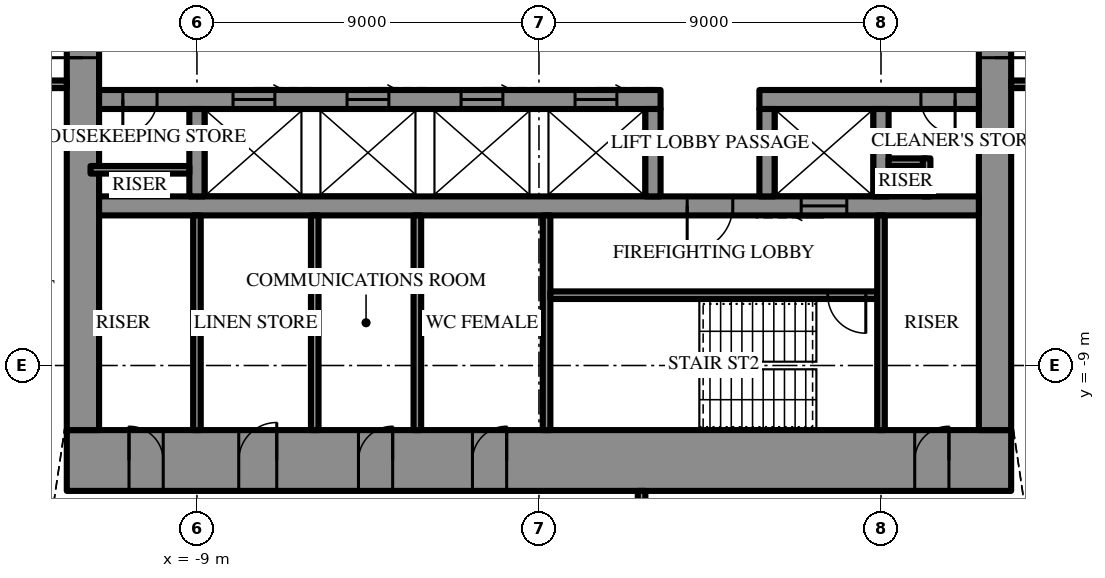
"""IFC4 building model, lengths in metres.
Left out: names, types, materials, properties, quantities, classifications, styles, units other than length and angle.
Written with IfcOpenShell. Run it as: python <this file> out.ifc"""

import sys

from ifc_helpers import new_model, si_unit, direction, frame, frame_2d, origin, place, context, subcontext, project, spatial, rectangle, extrude, element, fill, save


model = new_model("IFC4")
c1 = context("Model", 3, precision=1e-05, world=origin(), true_north=direction((0.0, 1.0)))
c2 = subcontext(c1, "Body", "Model", "MODEL_VIEW")
j1 = project(units=[si_unit("LENGTHUNIT", "METRE"), si_unit("PLANEANGLEUNIT", "RADIAN")], contexts=[c1])
p1 = place(None, origin())
s1 = spatial("IfcSite", under=j1, at=p1, CompositionType="ELEMENT")
p2 = place(p1, origin())
s2 = spatial("IfcBuilding", under=s1, at=p2, CompositionType="ELEMENT")
p3 = place(p2, frame((0.0, 0.0, 332.5)))
s3 = spatial("IfcBuildingStorey", under=s2, at=p3, CompositionType="ELEMENT", Elevation=332.5)
p4 = place(p3, frame((12.425, -11.5, 0.0), z_axis=(0.0, 0.0, 1.0), x_axis=(-1.0, 0.0, 0.0)))
e1 = element("IfcWall", 1, at=p4, inside=s3, PredefinedType="SHEAR", context=c2, shape_type="SweptSolid", body=[
    extrude(rectangle(XDim=24.85, YDim=1.6, at=frame_2d((12.425, 0.0))), origin(), (0.0, 0.0, 1.0), 4.2),
])
p5 = place(p4, frame((13.275, 0.0, 0.0)))
e2 = element("IfcOpeningElement", 2, at=p5, cuts=e1, PredefinedType="OPENING", context=c2, shape_type="SweptSolid", body=[
    extrude(rectangle(XDim=0.9, YDim=2.2, at=frame_2d((0.45, 1.1))), frame((0.0, 0.81, 0.0), z_axis=(0.0, -1.0, 0.0), x_axis=(1.0, 0.0, 0.0)), (0.0, 0.0, 1.0), 1.62),
])
p6 = place(p4, frame((16.275, 0.0, 0.0)))
e3 = element("IfcOpeningElement", 3, at=p6, cuts=e1, PredefinedType="OPENING", context=c2, shape_type="SweptSolid", body=[
    extrude(rectangle(XDim=0.9, YDim=2.2, at=frame_2d((0.45, 1.1))), frame((0.0, 0.81, 0.0), z_axis=(0.0, -1.0, 0.0), x_axis=(1.0, 0.0, 0.0)), (0.0, 0.0, 1.0), 1.62),
])
p7 = place(p4, frame((19.325, 0.0, 0.0)))
e4 = element("IfcOpeningElement", 4, at=p7, cuts=e1, PredefinedType="OPENING", context=c2, shape_type="SweptSolid", body=[
    extrude(rectangle(XDim=1.0, YDim=2.2, at=frame_2d((0.5, 1.1))), frame((0.0, 0.81, 0.0), z_axis=(0.0, -1.0, 0.0), x_axis=(1.0, 0.0, 0.0)), (0.0, 0.0, 1.0), 1.62),
])
p8 = place(p4, frame((1.637, 0.0, 0.0)))
e5 = element("IfcOpeningElement", 5, at=p8, cuts=e1, PredefinedType="OPENING", context=c2, shape_type="SweptSolid", body=[
    extrude(rectangle(XDim=0.9, YDim=2.2, at=frame_2d((0.45, 1.1))), frame((0.0, 0.81, 0.0), z_axis=(0.0, -1.0, 0.0), x_axis=(1.0, 0.0, 0.0)), (0.0, 0.0, 1.0), 1.62),
])
p9 = place(p4, frame((22.312, 0.0, 0.0)))
e6 = element("IfcOpeningElement", 6, at=p9, cuts=e1, PredefinedType="OPENING", context=c2, shape_type="SweptSolid", body=[
    extrude(rectangle(XDim=0.9, YDim=2.2, at=frame_2d((0.45, 1.1))), frame((0.0, 0.81, 0.0), z_axis=(0.0, -1.0, 0.0), x_axis=(1.0, 0.0, 0.0)), (0.0, 0.0, 1.0), 1.62),
])
p10 = place(p3, frame((12.0, -10.7, 0.0), z_axis=(0.0, 0.0, 1.0), x_axis=(0.0, 1.0, 0.0)))
e7 = element("IfcWall", 7, at=p10, inside=s3, PredefinedType="SHEAR", context=c2, shape_type="SweptSolid", body=[
    extrude(rectangle(XDim=21.4, YDim=0.85, at=frame_2d((10.7, 0.0))), origin(), (0.0, 0.0, 1.0), 4.2),
])
p11 = place(p10, frame((9.8, 0.0, 0.0)))
e8 = element("IfcOpeningElement", 8, at=p11, cuts=e7, PredefinedType="OPENING", context=c2, shape_type="SweptSolid", body=[
    extrude(rectangle(XDim=1.8, YDim=2.4, at=frame_2d((0.9, 1.2))), frame((0.0, 0.435, 0.0), z_axis=(0.0, -1.0, 0.0), x_axis=(1.0, 0.0, 0.0)), (0.0, 0.0, 1.0), 0.87),
])
p12 = place(p3, frame((-12.0, 10.7, 0.0), z_axis=(0.0, 0.0, 1.0), x_axis=(0.0, -1.0, 0.0)))
e9 = element("IfcWall", 9, at=p12, inside=s3, PredefinedType="SHEAR", context=c2, shape_type="SweptSolid", body=[
    extrude(rectangle(XDim=21.4, YDim=0.85, at=frame_2d((10.7, 0.0))), origin(), (0.0, 0.0, 1.0), 4.2),
])
p13 = place(p12, frame((9.8, 0.0, 0.0)))
e10 = element("IfcOpeningElement", 10, at=p13, cuts=e9, PredefinedType="OPENING", context=c2, shape_type="SweptSolid", body=[
    extrude(rectangle(XDim=1.8, YDim=2.4, at=frame_2d((0.9, 1.2))), frame((0.0, 0.435, 0.0), z_axis=(0.0, -1.0, 0.0), x_axis=(1.0, 0.0, 0.0)), (0.0, 0.0, 1.0), 0.87),
])
p14 = place(p3, frame((11.575, -2.0, 0.0), z_axis=(0.0, 0.0, 1.0), x_axis=(-1.0, 0.0, 0.0)))
e11 = element("IfcWall", 11, at=p14, inside=s3, PredefinedType="SHEAR", context=c2, shape_type="SweptSolid", body=[
    extrude(rectangle(XDim=5.775, YDim=0.5, at=frame_2d((2.887, 0.0))), origin(), (0.0, 0.0, 1.0), 4.2),
])
p15 = place(p14, frame((0.625, 0.0, 0.0)))
e12 = element("IfcOpeningElement", 12, at=p15, cuts=e11, PredefinedType="OPENING", context=c2, shape_type="SweptSolid", body=[
    extrude(rectangle(XDim=0.9, YDim=2.2, at=frame_2d((0.45, 1.1))), frame((0.0, 0.26, 0.0), z_axis=(0.0, -1.0, 0.0), x_axis=(1.0, 0.0, 0.0)), (0.0, 0.0, 1.0), 0.52),
])
p16 = place(p3, frame((3.2, -2.0, 0.0), z_axis=(0.0, 0.0, 1.0), x_axis=(-1.0, 0.0, 0.0)))
e13 = element("IfcWall", 13, at=p16, inside=s3, PredefinedType="SHEAR", context=c2, shape_type="SweptSolid", body=[
    extrude(rectangle(XDim=14.775, YDim=0.5, at=frame_2d((7.387, 0.0))), origin(), (0.0, 0.0, 1.0), 4.2),
])
p17 = place(p16, frame((13.25, 0.0, 0.0)))
e14 = element("IfcOpeningElement", 14, at=p17, cuts=e13, PredefinedType="OPENING", context=c2, shape_type="SweptSolid", body=[
    extrude(rectangle(XDim=0.9, YDim=2.2, at=frame_2d((0.45, 1.1))), frame((0.0, 0.26, 0.0), z_axis=(0.0, -1.0, 0.0), x_axis=(1.0, 0.0, 0.0)), (0.0, 0.0, 1.0), 0.52),
])
p18 = place(p16, frame((1.15, 0.0, 0.0)))
e15 = element("IfcOpeningElement", 15, at=p18, cuts=e13, PredefinedType="OPENING", context=c2, shape_type="SweptSolid", body=[
    extrude(rectangle(XDim=1.1, YDim=2.2, at=frame_2d((0.55, 1.1))), frame((0.0, 0.26, 0.0), z_axis=(0.0, -1.0, 0.0), x_axis=(1.0, 0.0, 0.0)), (0.0, 0.0, 1.0), 0.52),
])
p19 = place(p16, frame((4.15, 0.0, 0.0)))
e16 = element("IfcOpeningElement", 16, at=p19, cuts=e13, PredefinedType="OPENING", context=c2, shape_type="SweptSolid", body=[
    extrude(rectangle(XDim=1.1, YDim=2.2, at=frame_2d((0.55, 1.1))), frame((0.0, 0.26, 0.0), z_axis=(0.0, -1.0, 0.0), x_axis=(1.0, 0.0, 0.0)), (0.0, 0.0, 1.0), 0.52),
])
p20 = place(p16, frame((7.15, 0.0, 0.0)))
e17 = element("IfcOpeningElement", 17, at=p20, cuts=e13, PredefinedType="OPENING", context=c2, shape_type="SweptSolid", body=[
    extrude(rectangle(XDim=1.1, YDim=2.2, at=frame_2d((0.55, 1.1))), frame((0.0, 0.26, 0.0), z_axis=(0.0, -1.0, 0.0), x_axis=(1.0, 0.0, 0.0)), (0.0, 0.0, 1.0), 0.52),
])
p21 = place(p16, frame((10.15, 0.0, 0.0)))
e18 = element("IfcOpeningElement", 18, at=p21, cuts=e13, PredefinedType="OPENING", context=c2, shape_type="SweptSolid", body=[
    extrude(rectangle(XDim=1.1, YDim=2.2, at=frame_2d((0.55, 1.1))), frame((0.0, 0.26, 0.0), z_axis=(0.0, -1.0, 0.0), x_axis=(1.0, 0.0, 0.0)), (0.0, 0.0, 1.0), 0.52),
])
p22 = place(p3, frame((11.575, -4.8, 0.0), z_axis=(0.0, 0.0, 1.0), x_axis=(-1.0, 0.0, 0.0)))
e19 = element("IfcWall", 19, at=p22, inside=s3, PredefinedType="SHEAR", context=c2, shape_type="SweptSolid", body=[
    extrude(rectangle(XDim=23.15, YDim=0.5, at=frame_2d((11.575, 0.0))), origin(), (0.0, 0.0, 1.0), 4.2),
])
p23 = place(p22, frame((6.475, 0.0, 0.0)))
e20 = element("IfcOpeningElement", 20, at=p23, cuts=e19, PredefinedType="OPENING", context=c2, shape_type="SweptSolid", body=[
    extrude(rectangle(XDim=1.2, YDim=2.2, at=frame_2d((0.6, 1.1))), frame((0.0, 0.26, 0.0), z_axis=(0.0, -1.0, 0.0), x_axis=(1.0, 0.0, 0.0)), (0.0, 0.0, 1.0), 0.52),
])
p24 = place(p22, frame((3.475, 0.0, 0.0)))
e21 = element("IfcOpeningElement", 21, at=p24, cuts=e19, PredefinedType="OPENING", context=c2, shape_type="SweptSolid", body=[
    extrude(rectangle(XDim=1.2, YDim=2.2, at=frame_2d((0.6, 1.1))), frame((0.0, 0.26, 0.0), z_axis=(0.0, -1.0, 0.0), x_axis=(1.0, 0.0, 0.0)), (0.0, 0.0, 1.0), 0.52),
])
for number, where, z_axis, x_axis in (
    (22, (9.0, -2.25, 0.0), (0.0, 0.0, 1.0), (0.0, -1.0, 0.0)),
    (23, (6.0, -2.25, 0.0), (0.0, 0.0, 1.0), (0.0, -1.0, 0.0)),
    (24, (3.0, -2.25, 0.0), (0.0, 0.0, 1.0), (0.0, -1.0, 0.0)),
    (25, (-9.0, -2.25, 0.0), (0.0, 0.0, 1.0), (0.0, -1.0, 0.0)),
):
    element("IfcWall", number, at=place(p3, frame(where, z_axis=z_axis, x_axis=x_axis)), inside=s3, PredefinedType="SHEAR", context=c2, shape_type="SweptSolid", body=[
        extrude(rectangle(XDim=2.3, YDim=0.4, at=frame_2d((1.15, 0.0))), origin(), (0.0, 0.0, 1.0), 4.2),
    ])
p25 = place(p3, frame((0.2, -5.05, 0.0), z_axis=(0.0, 0.0, 1.0), x_axis=(0.0, -1.0, 0.0)))
e26 = element("IfcWall", 26, at=p25, inside=s3, PredefinedType="SHEAR", context=c2, shape_type="SweptSolid", body=[
    extrude(rectangle(XDim=5.65, YDim=0.2, at=frame_2d((2.825, 0.0))), origin(), (0.0, 0.0, 1.0), 4.2),
])
p26 = place(p3, frame((8.9, -7.15, 0.0), z_axis=(0.0, 0.0, 1.0), x_axis=(-1.0, 0.0, 0.0)))
e27 = element("IfcWall", 27, at=p26, inside=s3, PredefinedType="SHEAR", context=c2, shape_type="SweptSolid", body=[
    extrude(rectangle(XDim=8.6, YDim=0.2, at=frame_2d((4.3, 0.0))), origin(), (0.0, 0.0, 1.0), 4.2),
])
p27 = place(p26, frame((0.3, 0.0, 0.0)))
e28 = element("IfcOpeningElement", 28, at=p27, cuts=e27, PredefinedType="OPENING", context=c2, shape_type="SweptSolid", body=[
    extrude(rectangle(XDim=1.0, YDim=2.2, at=frame_2d((0.5, 1.1))), frame((0.0, 0.11, 0.0), z_axis=(0.0, -1.0, 0.0), x_axis=(1.0, 0.0, 0.0)), (0.0, 0.0, 1.0), 0.22),
])
for number, where, z_axis, x_axis in (
    (29, (9.0, -5.05, 0.0), (0.0, 0.0, 1.0), (0.0, -1.0, 0.0)),
    (30, (-9.0, -5.05, 0.0), (0.0, 0.0, 1.0), (0.0, -1.0, 0.0)),
    (31, (-3.2, -5.05, 0.0), (0.0, 0.0, 1.0), (0.0, -1.0, 0.0)),
    (32, (-5.9, -5.05, 0.0), (0.0, 0.0, 1.0), (0.0, -1.0, 0.0)),
):
    element("IfcWall", number, at=place(p3, frame(where, z_axis=z_axis, x_axis=x_axis)), inside=s3, PredefinedType="PARTITIONING", context=c2, shape_type="SweptSolid", body=[
        extrude(rectangle(XDim=5.65, YDim=0.2, at=frame_2d((2.825, 0.0))), origin(), (0.0, 0.0, 1.0), 4.0),
    ])
for number, where, z_axis, x_axis in (
    (33, (10.2, -3.65, 0.0), (0.0, 0.0, 1.0), (-1.0, 0.0, 0.0)),
    (34, (10.2, -3.55, 0.0), (0.0, 0.0, 1.0), (0.0, -1.0, 0.0)),
):
    element("IfcWall", number, at=place(p3, frame(where, z_axis=z_axis, x_axis=x_axis)), inside=s3, PredefinedType="PARTITIONING", context=c2, shape_type="SweptSolid", body=[
        extrude(rectangle(XDim=1.0, YDim=0.2, at=frame_2d((0.5, 0.0))), origin(), (0.0, 0.0, 1.0), 4.0),
    ])
p28 = place(p3, frame((-9.2, -3.85, 0.0), z_axis=(0.0, 0.0, 1.0), x_axis=(-1.0, 0.0, 0.0)))
e35 = element("IfcWall", 35, at=p28, inside=s3, PredefinedType="PARTITIONING", context=c2, shape_type="SweptSolid", body=[
    extrude(rectangle(XDim=2.6, YDim=0.2, at=frame_2d((1.3, 0.0))), origin(), (0.0, 0.0, 1.0), 4.0),
])
p29 = place(p3, frame((2.7, -12.3, 0.0), z_axis=(0.0, 0.0, 1.0), x_axis=(0.0, -1.0, 0.0)))
e36 = element("IfcWall", 36, at=p29, inside=s3, PredefinedType="PARTITIONING", context=c2, shape_type="SweptSolid", body=[
    extrude(rectangle(XDim=1.7, YDim=0.2, at=frame_2d((0.85, 0.0))), origin(), (0.0, 0.0, 1.0), 4.0),
])
p30 = place(p29, frame((0.35, 0.0, 0.0)))
e37 = element("IfcOpeningElement", 37, at=p30, cuts=e36, PredefinedType="OPENING", context=c2, shape_type="SweptSolid", body=[
    extrude(rectangle(XDim=1.0, YDim=2.2, at=frame_2d((0.5, 1.1))), frame((0.0, 0.11, 0.0), z_axis=(0.0, -1.0, 0.0), x_axis=(1.0, 0.0, 0.0)), (0.0, 0.0, 1.0), 0.22),
])
p31 = place(p3, frame((12.425, -1.6, 0.0), z_axis=(0.0, 0.0, 1.0), x_axis=(1.0, 0.0, 0.0)))
e38 = element("IfcWall", 38, at=p31, inside=s3, PredefinedType="PARTITIONING", context=c2, shape_type="SweptSolid", body=[
    extrude(rectangle(XDim=16.5, YDim=0.2, at=frame_2d((8.25, 0.0))), origin(), (0.0, 0.0, 1.0), 4.0),
])
p32 = place(p31, frame((1.15, 0.0, 0.0)))
e39 = element("IfcOpeningElement", 39, at=p32, cuts=e38, PredefinedType="OPENING", context=c2, shape_type="SweptSolid", body=[
    extrude(rectangle(XDim=1.0, YDim=2.2, at=frame_2d((0.5, 1.1))), frame((0.0, 0.11, 0.0), z_axis=(0.0, -1.0, 0.0), x_axis=(1.0, 0.0, 0.0)), (0.0, 0.0, 1.0), 0.22),
])
p33 = place(p3, frame((-12.425, -1.6, 0.0), z_axis=(0.0, 0.0, 1.0), x_axis=(-1.0, 0.0, 0.0)))
e40 = element("IfcWall", 40, at=p33, inside=s3, PredefinedType="PARTITIONING", context=c2, shape_type="SweptSolid", body=[
    extrude(rectangle(XDim=16.5, YDim=0.2, at=frame_2d((8.25, 0.0))), origin(), (0.0, 0.0, 1.0), 4.0),
])
p34 = place(p33, frame((1.15, 0.0, 0.0)))
e41 = element("IfcOpeningElement", 41, at=p34, cuts=e40, PredefinedType="OPENING", context=c2, shape_type="SweptSolid", body=[
    extrude(rectangle(XDim=1.0, YDim=2.2, at=frame_2d((0.5, 1.1))), frame((0.0, 0.11, 0.0), z_axis=(0.0, -1.0, 0.0), x_axis=(1.0, 0.0, 0.0)), (0.0, 0.0, 1.0), 0.22),
])
p35 = place(p11, frame((1.8, 0.0, 0.0), z_axis=(0.0, 0.0, 1.0), x_axis=(-1.0, 0.0, 0.0)))
e42 = element("IfcDoor", 42, at=p35, inside=s3, OperationType="DOUBLE_DOOR_SINGLE_SWING", PredefinedType="DOOR", context=c2, shape_type="SweptSolid", body=[
    extrude(rectangle(XDim=1.8, YDim=2.4, at=frame_2d((0.9, 1.2))), frame((0.0, 0.025, 0.0), z_axis=(0.0, -1.0, 0.0), x_axis=(1.0, 0.0, 0.0)), (0.0, 0.0, 1.0), 0.05),
])
fill(e8, e42)
p36 = place(p13, frame((1.8, 0.0, 0.0), z_axis=(0.0, 0.0, 1.0), x_axis=(-1.0, 0.0, 0.0)))
e43 = element("IfcDoor", 43, at=p36, inside=s3, OperationType="DOUBLE_DOOR_SINGLE_SWING", PredefinedType="DOOR", context=c2, shape_type="SweptSolid", body=[
    extrude(rectangle(XDim=1.8, YDim=2.4, at=frame_2d((0.9, 1.2))), frame((0.0, 0.025, 0.0), z_axis=(0.0, -1.0, 0.0), x_axis=(1.0, 0.0, 0.0)), (0.0, 0.0, 1.0), 0.05),
])
fill(e10, e43)
p37 = place(p23, origin())
e44 = element("IfcDoor", 44, at=p37, inside=s3, OperationType="SINGLE_SWING_LEFT", PredefinedType="DOOR", context=c2, shape_type="SweptSolid", body=[
    extrude(rectangle(XDim=1.2, YDim=2.2, at=frame_2d((0.6, 1.1))), frame((0.0, 0.025, 0.0), z_axis=(0.0, -1.0, 0.0), x_axis=(1.0, 0.0, 0.0)), (0.0, 0.0, 1.0), 0.05),
])
fill(e20, e44)
p38 = place(p27, origin())
e45 = element("IfcDoor", 45, at=p38, inside=s3, OperationType="SINGLE_SWING_RIGHT", PredefinedType="DOOR", context=c2, shape_type="SweptSolid", body=[
    extrude(rectangle(XDim=1.0, YDim=2.2, at=frame_2d((0.5, 1.1))), frame((0.0, 0.025, 0.0), z_axis=(0.0, -1.0, 0.0), x_axis=(1.0, 0.0, 0.0)), (0.0, 0.0, 1.0), 0.05),
])
fill(e28, e45)
p39 = place(p5, frame((0.9, 0.0, 0.0), z_axis=(0.0, 0.0, 1.0), x_axis=(-1.0, 0.0, 0.0)))
e46 = element("IfcDoor", 46, at=p39, inside=s3, OperationType="SINGLE_SWING_LEFT", PredefinedType="DOOR", context=c2, shape_type="SweptSolid", body=[
    extrude(rectangle(XDim=0.9, YDim=2.2, at=frame_2d((0.45, 1.1))), frame((0.0, 0.025, 0.0), z_axis=(0.0, -1.0, 0.0), x_axis=(1.0, 0.0, 0.0)), (0.0, 0.0, 1.0), 0.05),
])
fill(e2, e46)
p40 = place(p6, frame((0.9, 0.0, 0.0), z_axis=(0.0, 0.0, 1.0), x_axis=(-1.0, 0.0, 0.0)))
e47 = element("IfcDoor", 47, at=p40, inside=s3, OperationType="SINGLE_SWING_LEFT", PredefinedType="DOOR", context=c2, shape_type="SweptSolid", body=[
    extrude(rectangle(XDim=0.9, YDim=2.2, at=frame_2d((0.45, 1.1))), frame((0.0, 0.025, 0.0), z_axis=(0.0, -1.0, 0.0), x_axis=(1.0, 0.0, 0.0)), (0.0, 0.0, 1.0), 0.05),
])
fill(e3, e47)
p41 = place(p7, frame((1.0, 0.0, 0.0), z_axis=(0.0, 0.0, 1.0), x_axis=(-1.0, 0.0, 0.0)))
e48 = element("IfcDoor", 48, at=p41, inside=s3, OperationType="SINGLE_SWING_LEFT", PredefinedType="DOOR", context=c2, shape_type="SweptSolid", body=[
    extrude(rectangle(XDim=1.0, YDim=2.2, at=frame_2d((0.5, 1.1))), frame((0.0, 0.025, 0.0), z_axis=(0.0, -1.0, 0.0), x_axis=(1.0, 0.0, 0.0)), (0.0, 0.0, 1.0), 0.05),
])
fill(e4, e48)
p42 = place(p8, frame((0.9, 0.0, 0.0), z_axis=(0.0, 0.0, 1.0), x_axis=(-1.0, 0.0, 0.0)))
e49 = element("IfcDoor", 49, at=p42, inside=s3, OperationType="SINGLE_SWING_LEFT", PredefinedType="DOOR", context=c2, shape_type="SweptSolid", body=[
    extrude(rectangle(XDim=0.9, YDim=2.2, at=frame_2d((0.45, 1.1))), frame((0.0, 0.025, 0.0), z_axis=(0.0, -1.0, 0.0), x_axis=(1.0, 0.0, 0.0)), (0.0, 0.0, 1.0), 0.05),
])
fill(e5, e49)
p43 = place(p9, frame((0.9, 0.0, 0.0), z_axis=(0.0, 0.0, 1.0), x_axis=(-1.0, 0.0, 0.0)))
e50 = element("IfcDoor", 50, at=p43, inside=s3, OperationType="SINGLE_SWING_RIGHT", PredefinedType="DOOR", context=c2, shape_type="SweptSolid", body=[
    extrude(rectangle(XDim=0.9, YDim=2.2, at=frame_2d((0.45, 1.1))), frame((0.0, 0.025, 0.0), z_axis=(0.0, -1.0, 0.0), x_axis=(1.0, 0.0, 0.0)), (0.0, 0.0, 1.0), 0.05),
])
fill(e6, e50)
p44 = place(p15, origin())
e51 = element("IfcDoor", 51, at=p44, inside=s3, OperationType="SINGLE_SWING_RIGHT", PredefinedType="DOOR", context=c2, shape_type="SweptSolid", body=[
    extrude(rectangle(XDim=0.9, YDim=2.2, at=frame_2d((0.45, 1.1))), frame((0.0, 0.025, 0.0), z_axis=(0.0, -1.0, 0.0), x_axis=(1.0, 0.0, 0.0)), (0.0, 0.0, 1.0), 0.05),
])
fill(e12, e51)
p45 = place(p17, origin())
e52 = element("IfcDoor", 52, at=p45, inside=s3, OperationType="SINGLE_SWING_LEFT", PredefinedType="DOOR", context=c2, shape_type="SweptSolid", body=[
    extrude(rectangle(XDim=0.9, YDim=2.2, at=frame_2d((0.45, 1.1))), frame((0.0, 0.025, 0.0), z_axis=(0.0, -1.0, 0.0), x_axis=(1.0, 0.0, 0.0)), (0.0, 0.0, 1.0), 0.05),
])
fill(e14, e52)
p46 = place(p24, origin())
e53 = element("IfcDoor", 53, at=p46, inside=s3, OperationType="SLIDING_TO_LEFT", PredefinedType="DOOR", context=c2, shape_type="SweptSolid", body=[
    extrude(rectangle(XDim=1.2, YDim=2.2, at=frame_2d((0.6, 1.1))), frame((0.0, 0.025, 0.0), z_axis=(0.0, -1.0, 0.0), x_axis=(1.0, 0.0, 0.0)), (0.0, 0.0, 1.0), 0.05),
])
fill(e21, e53)
p47 = place(p18, frame((1.1, 0.0, 0.0), z_axis=(0.0, 0.0, 1.0), x_axis=(-1.0, 0.0, 0.0)))
e54 = element("IfcDoor", 54, at=p47, inside=s3, OperationType="SLIDING_TO_LEFT", PredefinedType="DOOR", context=c2, shape_type="SweptSolid", body=[
    extrude(rectangle(XDim=1.1, YDim=2.2, at=frame_2d((0.55, 1.1))), frame((0.0, 0.025, 0.0), z_axis=(0.0, -1.0, 0.0), x_axis=(1.0, 0.0, 0.0)), (0.0, 0.0, 1.0), 0.05),
])
fill(e15, e54)
p48 = place(p19, frame((1.1, 0.0, 0.0), z_axis=(0.0, 0.0, 1.0), x_axis=(-1.0, 0.0, 0.0)))
e55 = element("IfcDoor", 55, at=p48, inside=s3, OperationType="SLIDING_TO_LEFT", PredefinedType="DOOR", context=c2, shape_type="SweptSolid", body=[
    extrude(rectangle(XDim=1.1, YDim=2.2, at=frame_2d((0.55, 1.1))), frame((0.0, 0.025, 0.0), z_axis=(0.0, -1.0, 0.0), x_axis=(1.0, 0.0, 0.0)), (0.0, 0.0, 1.0), 0.05),
])
fill(e16, e55)
p49 = place(p20, frame((1.1, 0.0, 0.0), z_axis=(0.0, 0.0, 1.0), x_axis=(-1.0, 0.0, 0.0)))
e56 = element("IfcDoor", 56, at=p49, inside=s3, OperationType="SLIDING_TO_LEFT", PredefinedType="DOOR", context=c2, shape_type="SweptSolid", body=[
    extrude(rectangle(XDim=1.1, YDim=2.2, at=frame_2d((0.55, 1.1))), frame((0.0, 0.025, 0.0), z_axis=(0.0, -1.0, 0.0), x_axis=(1.0, 0.0, 0.0)), (0.0, 0.0, 1.0), 0.05),
])
fill(e17, e56)
p50 = place(p21, frame((1.1, 0.0, 0.0), z_axis=(0.0, 0.0, 1.0), x_axis=(-1.0, 0.0, 0.0)))
e57 = element("IfcDoor", 57, at=p50, inside=s3, OperationType="SLIDING_TO_LEFT", PredefinedType="DOOR", context=c2, shape_type="SweptSolid", body=[
    extrude(rectangle(XDim=1.1, YDim=2.2, at=frame_2d((0.55, 1.1))), frame((0.0, 0.025, 0.0), z_axis=(0.0, -1.0, 0.0), x_axis=(1.0, 0.0, 0.0)), (0.0, 0.0, 1.0), 0.05),
])
fill(e18, e57)
save(model, sys.argv[1])
